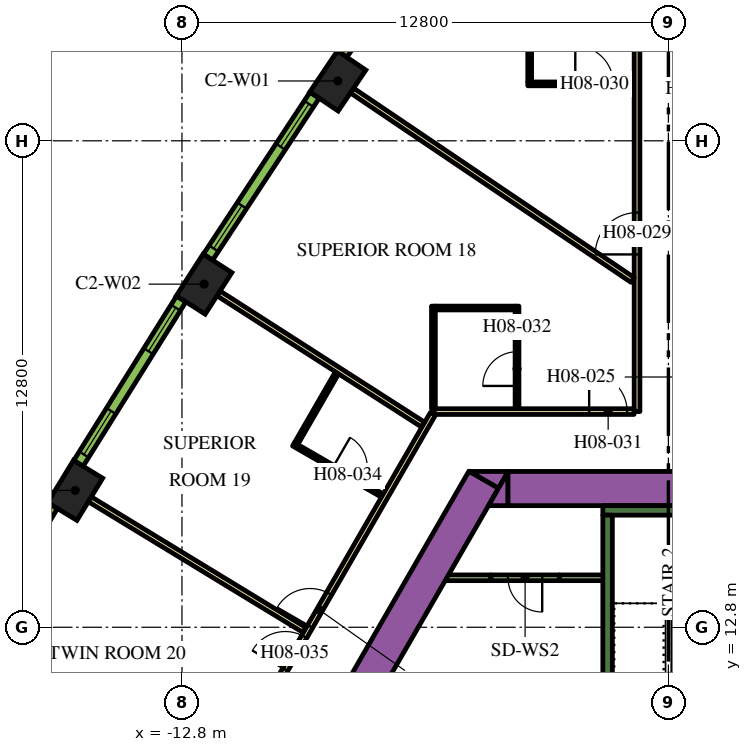
"""IFC4 building model, lengths in metres.
Left out: names, types, materials, properties, quantities, classifications, styles, units other than length and angle.
Written with IfcOpenShell. Run it as: python <this file> out.ifc"""

import sys

from ifc_helpers import new_model, si_unit, direction, frame, frame_2d, origin, origin_2d, place, context, subcontext, project, spatial, polyline, rectangle, outline, extrude, element, fill, save


model = new_model("IFC4")
c1 = context("Model", 3, precision=1e-05, world=origin(), true_north=direction((0.0, 1.0)))
c2 = subcontext(c1, "Body", "Model", "MODEL_VIEW")
j1 = project(units=[si_unit("LENGTHUNIT", "METRE"), si_unit("PLANEANGLEUNIT", "RADIAN")], contexts=[c1])
p1 = place(None, origin())
s1 = spatial("IfcSite", under=j1, at=p1, CompositionType="ELEMENT")
p2 = place(p1, origin())
s2 = spatial("IfcBuilding", under=s1, at=p2, CompositionType="ELEMENT")
p3 = place(p2, frame((0.0, 0.0, 111.0)))
s3 = spatial("IfcBuildingStorey", under=s2, at=p3, CompositionType="ELEMENT", Elevation=111.0)
for number, where, z_axis, x_axis in (
    (1, (-8.699, 27.174, 0.0), (0.0, 0.0, 1.0), (-0.559, -0.829, 0.0)),
    (2, (-12.217, 21.828, 0.0), (0.0, 0.0, 1.0), (-0.54, -0.842, 0.0)),
    (3, (-15.609, 16.402, 0.0), (0.0, 0.0, 1.0), (-0.52, -0.854, 0.0)),
):
    element("IfcColumn", number, at=place(p3, frame(where, z_axis=z_axis, x_axis=x_axis)), inside=s3, PredefinedType="COLUMN", context=c2, shape_type="SweptSolid", body=[
        extrude(rectangle(XDim=1.3, YDim=0.9, at=origin_2d()), origin(), (0.0, 0.0, 1.0), 3.9),
    ])
p4 = place(p3, frame((-15.36, -1.503, 0.0), z_axis=(0.0, 0.0, 1.0), x_axis=(0.50000389221, 0.866023156604, 0.0)))
e4 = element("IfcWall", 4, at=p4, inside=s3, PredefinedType="SOLIDWALL", context=c2, shape_type="SweptSolid", body=[
    extrude(rectangle(XDim=21.0, YDim=0.9, at=frame_2d((10.5, 0.0))), origin(), (0.0, 0.0, 1.0), 3.9),
])
p5 = place(p3, origin())
e5 = element("IfcWall", 5, at=p5, inside=s3, PredefinedType="SOLIDWALL", context=c2, shape_type="SweptSolid", body=[
    extrude(outline(polyline([(-4.215, 16.9), (-4.469, 16.46), (-5.231, 16.9), (-4.215, 16.9)])), origin(), (0.0, 0.0, 1.0), 3.9),
])
p6 = place(p3, frame((-4.224, 16.45, 0.0), z_axis=(0.0, 0.0, 1.0), x_axis=(1.0, 0.0, 0.0)))
e6 = element("IfcWall", 6, at=p6, inside=s3, PredefinedType="SOLIDWALL", context=c2, shape_type="SweptSolid", body=[
    extrude(rectangle(XDim=9.488, YDim=0.9, at=frame_2d((4.744, 0.0))), origin(), (0.0, 0.0, 1.0), 3.9),
])
e7 = element("IfcWall", 7, at=p5, inside=s3, PredefinedType="SOLIDWALL", context=c2, shape_type="SweptSolid", body=[
    extrude(outline(polyline([(-4.734, 16.0), (-4.226, 16.88), (-4.226, 16.0), (-4.734, 16.0)])), origin(), (0.0, 0.0, 1.0), 3.9),
])
p7 = place(p3, frame((-1.725, 15.875, 0.0), z_axis=(0.0, 0.0, 1.0), x_axis=(1.0, 0.0, 0.0)))
e8 = element("IfcWall", 8, at=p7, inside=s3, PredefinedType="SOLIDWALL", context=c2, shape_type="SweptSolid", body=[
    extrude(rectangle(XDim=3.45, YDim=0.25, at=frame_2d((1.725, 0.0))), origin(), (0.0, 0.0, 1.0), 3.9),
])
p8 = place(p3, frame((-1.6, 8.7, 0.0), z_axis=(0.0, 0.0, 1.0), x_axis=(0.0, 1.0, 0.0)))
e9 = element("IfcWall", 9, at=p8, inside=s3, PredefinedType="SOLIDWALL", context=c2, shape_type="SweptSolid", body=[
    extrude(rectangle(XDim=7.05, YDim=0.25, at=frame_2d((3.525, 0.0))), origin(), (0.0, 0.0, 1.0), 3.9),
])
p9 = place(p3, frame((-5.851, 14.102, 0.0), z_axis=(0.0, 0.0, 1.0), x_axis=(1.0, 0.0, 0.0)))
e10 = element("IfcWall", 10, at=p9, inside=s3, PredefinedType="PARTITIONING", context=c2, shape_type="SweptSolid", body=[
    extrude(rectangle(XDim=1.18, YDim=0.15, at=frame_2d((0.59, 0.0))), origin(), (0.0, 0.0, 1.0), 2.75),
])
p10 = place(p3, frame((-2.871, 14.102, 0.0), z_axis=(0.0, 0.0, 1.0), x_axis=(1.0, 0.0, 0.0)))
e11 = element("IfcWall", 11, at=p10, inside=s3, PredefinedType="PARTITIONING", context=c2, shape_type="SweptSolid", body=[
    extrude(rectangle(XDim=1.196, YDim=0.15, at=frame_2d((0.598, 0.0))), origin(), (0.0, 0.0, 1.0), 2.75),
])
p11 = place(p3, frame((-2.871, 14.102, 0.0), z_axis=(0.0, 0.0, 1.0), x_axis=(-1.0, 0.0, 0.0)))
e12 = element("IfcWall", 12, at=p11, inside=s3, PredefinedType="PARTITIONING", context=c2, shape_type="SweptSolid", body=[
    extrude(rectangle(XDim=1.8, YDim=0.15, at=frame_2d((0.9, 0.0))), origin(), (0.0, 0.0, 1.0), 2.75),
])
p12 = place(p11, frame((0.45, 0.0, 0.0)))
e13 = element("IfcOpeningElement", 13, at=p12, cuts=e12, PredefinedType="OPENING", context=c2, shape_type="SweptSolid", body=[
    extrude(rectangle(XDim=0.9, YDim=2.1, at=frame_2d((0.45, 1.05))), frame((0.0, 0.085, 0.0), z_axis=(0.0, -1.0, 0.0), x_axis=(1.0, 0.0, 0.0)), (0.0, 0.0, 1.0), 0.17),
])
p13 = place(p3, frame((-0.825, 18.475, 0.0), z_axis=(0.0, 0.0, 1.0), x_axis=(0.0, 1.0, 0.0)))
e14 = element("IfcWall", 14, at=p13, inside=s3, PredefinedType="PARTITIONING", context=c2, shape_type="SweptSolid", body=[
    extrude(rectangle(XDim=13.623, YDim=0.15, at=frame_2d((6.812, 0.0))), origin(), (0.0, 0.0, 1.0), 2.75),
])
p14 = place(p13, frame((4.135, 0.0, 0.0)))
e15 = element("IfcOpeningElement", 15, at=p14, cuts=e14, PredefinedType="OPENING", context=c2, shape_type="SweptSolid", body=[
    extrude(rectangle(XDim=1.1, YDim=2.1, at=frame_2d((0.55, 1.05))), frame((0.0, 0.085, 0.0), z_axis=(0.0, -1.0, 0.0), x_axis=(1.0, 0.0, 0.0)), (0.0, 0.0, 1.0), 0.17),
])
p15 = place(p3, frame((-6.163, 18.475, 0.0), z_axis=(0.0, 0.0, 1.0), x_axis=(1.0, 0.0, 0.0)))
e16 = element("IfcWall", 16, at=p15, inside=s3, PredefinedType="PARTITIONING", context=c2, shape_type="SweptSolid", body=[
    extrude(rectangle(XDim=5.258, YDim=0.15, at=frame_2d((2.629, 0.0))), origin(), (0.0, 0.0, 1.0), 2.75),
])
p16 = place(p15, frame((4.078, 0.0, 0.0)))
e17 = element("IfcOpeningElement", 17, at=p16, cuts=e16, PredefinedType="OPENING", context=c2, shape_type="SweptSolid", body=[
    extrude(rectangle(XDim=1.0, YDim=2.1, at=frame_2d((0.5, 1.05))), frame((0.0, 0.085, 0.0), z_axis=(0.0, -1.0, 0.0), x_axis=(1.0, 0.0, 0.0)), (0.0, 0.0, 1.0), 0.17),
])
p17 = place(p3, frame((-19.081, -3.9, 0.0), z_axis=(0.0, 0.0, 1.0), x_axis=(0.499998313975, 0.866026377209, 0.0)))
e18 = element("IfcWall", 18, at=p17, inside=s3, PredefinedType="PARTITIONING", context=c2, shape_type="SweptSolid", body=[
    extrude(rectangle(XDim=25.766, YDim=0.15, at=frame_2d((12.883, 0.0))), origin(), (0.0, 0.0, 1.0), 2.75),
])
p18 = place(p17, frame((19.306, 0.0, 0.0)))
e19 = element("IfcOpeningElement", 19, at=p18, cuts=e18, PredefinedType="OPENING", context=c2, shape_type="SweptSolid", body=[
    extrude(rectangle(XDim=1.0, YDim=2.1, at=frame_2d((0.5, 1.05))), frame((0.0, 0.085, 0.0), z_axis=(0.0, -1.0, 0.0), x_axis=(1.0, 0.0, 0.0)), (0.0, 0.0, 1.0), 0.17),
])
p19 = place(p17, frame((18.0, 0.0, 0.0)))
e20 = element("IfcOpeningElement", 20, at=p19, cuts=e18, PredefinedType="OPENING", context=c2, shape_type="SweptSolid", body=[
    extrude(rectangle(XDim=1.0, YDim=2.1, at=frame_2d((0.5, 1.05))), frame((0.0, 0.085, 0.0), z_axis=(0.0, -1.0, 0.0), x_axis=(1.0, 0.0, 0.0)), (0.0, 0.0, 1.0), 0.17),
])
p20 = place(p17, frame((6.838, 0.0, 0.0)))
e21 = element("IfcOpeningElement", 21, at=p20, cuts=e18, PredefinedType="OPENING", context=c2, shape_type="SweptSolid", body=[
    extrude(rectangle(XDim=1.0, YDim=2.1, at=frame_2d((0.5, 1.05))), frame((0.0, 0.085, 0.0), z_axis=(0.0, -1.0, 0.0), x_axis=(1.0, 0.0, 0.0)), (0.0, 0.0, 1.0), 0.17),
])
p21 = place(p17, frame((4.674, 0.0, 0.0)))
e22 = element("IfcOpeningElement", 22, at=p21, cuts=e18, PredefinedType="OPENING", context=c2, shape_type="SweptSolid", body=[
    extrude(rectangle(XDim=0.9, YDim=2.1, at=frame_2d((0.45, 1.05))), frame((0.0, 0.085, 0.0), z_axis=(0.0, -1.0, 0.0), x_axis=(1.0, 0.0, 0.0)), (0.0, 0.0, 1.0), 0.17),
])
p22 = place(p17, frame((0.18, 0.0, 0.0)))
e23 = element("IfcOpeningElement", 23, at=p22, cuts=e18, PredefinedType="OPENING", context=c2, shape_type="SweptSolid", body=[
    extrude(rectangle(XDim=1.0, YDim=2.1, at=frame_2d((0.5, 1.05))), frame((0.0, 0.085, 0.0), z_axis=(0.0, -1.0, 0.0), x_axis=(1.0, 0.0, 0.0)), (0.0, 0.0, 1.0), 0.17),
])
p23 = place(p3, frame((-15.225, 16.167, 0.0), z_axis=(0.0, 0.0, 1.0), x_axis=(0.854088713274, -0.520127359266, 0.0)))
e24 = element("IfcWall", 24, at=p23, inside=s3, PredefinedType="PARTITIONING", context=c2, shape_type="SweptSolid", body=[
    extrude(rectangle(XDim=6.611, YDim=0.15, at=frame_2d((3.305, 0.0))), origin(), (0.0, 0.0, 1.0), 2.75),
])
p24 = place(p3, frame((-11.838, 21.585, 0.0), z_axis=(0.0, 0.0, 1.0), x_axis=(0.841699322813, -0.539946525108, 0.0)))
e25 = element("IfcWall", 25, at=p24, inside=s3, PredefinedType="PARTITIONING", context=c2, shape_type="SweptSolid", body=[
    extrude(rectangle(XDim=6.392, YDim=0.15, at=frame_2d((3.196, 0.0))), origin(), (0.0, 0.0, 1.0), 2.75),
])
p25 = place(p3, frame((-8.326, 26.923, 0.0), z_axis=(0.0, 0.0, 1.0), x_axis=(0.828836601893, -0.5594907393, 0.0)))
e26 = element("IfcWall", 26, at=p25, inside=s3, PredefinedType="PARTITIONING", context=c2, shape_type="SweptSolid", body=[
    extrude(rectangle(XDim=8.909, YDim=0.15, at=frame_2d((4.455, 0.0))), origin(), (0.0, 0.0, 1.0), 2.75),
])
p26 = place(p3, frame((-3.7, 27.098, 0.0), z_axis=(0.0, 0.0, 1.0), x_axis=(1.0, 0.0, 0.0)))
e27 = element("IfcWall", 27, at=p26, inside=s3, PredefinedType="PARTITIONING", context=c2, shape_type="SweptSolid", body=[
    extrude(rectangle(XDim=2.8, YDim=0.1, at=frame_2d((1.4, 0.0))), origin(), (0.0, 0.0, 1.0), 2.75),
])
p27 = place(p26, frame((1.25, 0.0, 0.0)))
e28 = element("IfcOpeningElement", 28, at=p27, cuts=e27, PredefinedType="OPENING", context=c2, shape_type="SweptSolid", body=[
    extrude(rectangle(XDim=1.0, YDim=2.1, at=frame_2d((0.5, 1.05))), frame((0.0, 0.06, 0.0), z_axis=(0.0, -1.0, 0.0), x_axis=(1.0, 0.0, 0.0)), (0.0, 0.0, 1.0), 0.12),
])
p28 = place(p3, frame((-3.65, 27.148, 0.0), z_axis=(0.0, 0.0, 1.0), x_axis=(0.0, 1.0, 0.0)))
e29 = element("IfcWall", 29, at=p28, inside=s3, PredefinedType="PARTITIONING", context=c2, shape_type="SweptSolid", body=[
    extrude(rectangle(XDim=2.5, YDim=0.1, at=frame_2d((1.25, 0.0))), origin(), (0.0, 0.0, 1.0), 2.75),
])
p29 = place(p3, frame((-3.983, 18.55, 0.0), z_axis=(0.0, 0.0, 1.0), x_axis=(0.0, 1.0, 0.0)))
e30 = element("IfcWall", 30, at=p29, inside=s3, PredefinedType="PARTITIONING", context=c2, shape_type="SweptSolid", body=[
    extrude(rectangle(XDim=2.7, YDim=0.1, at=frame_2d((1.35, 0.0))), origin(), (0.0, 0.0, 1.0), 2.75),
])
p30 = place(p29, frame((0.6, 0.0, 0.0)))
e31 = element("IfcOpeningElement", 31, at=p30, cuts=e30, PredefinedType="OPENING", context=c2, shape_type="SweptSolid", body=[
    extrude(rectangle(XDim=0.9, YDim=2.1, at=frame_2d((0.45, 1.05))), frame((0.0, 0.06, 0.0), z_axis=(0.0, -1.0, 0.0), x_axis=(1.0, 0.0, 0.0)), (0.0, 0.0, 1.0), 0.12),
])
p31 = place(p3, frame((-4.033, 21.2, 0.0), z_axis=(0.0, 0.0, 1.0), x_axis=(-1.0, 0.0, 0.0)))
e32 = element("IfcWall", 32, at=p31, inside=s3, PredefinedType="PARTITIONING", context=c2, shape_type="SweptSolid", body=[
    extrude(rectangle(XDim=2.1, YDim=0.1, at=frame_2d((1.05, 0.0))), origin(), (0.0, 0.0, 1.0), 2.75),
])
p32 = place(p3, frame((-6.183, 18.55, 0.0), z_axis=(0.0, 0.0, 1.0), x_axis=(0.0, 1.0, 0.0)))
e33 = element("IfcWall", 33, at=p32, inside=s3, PredefinedType="PARTITIONING", context=c2, shape_type="SweptSolid", body=[
    extrude(rectangle(XDim=2.7, YDim=0.1, at=frame_2d((1.35, 0.0))), origin(), (0.0, 0.0, 1.0), 2.75),
])
p33 = place(p3, frame((-9.864, 17.615, 0.0), z_axis=(0.0, 0.0, 1.0), x_axis=(0.866019956843, -0.50000943426, 0.0)))
e34 = element("IfcWall", 34, at=p33, inside=s3, PredefinedType="PARTITIONING", context=c2, shape_type="SweptSolid", body=[
    extrude(rectangle(XDim=2.7, YDim=0.1, at=frame_2d((1.35, 0.0))), origin(), (0.0, 0.0, 1.0), 2.75),
])
p34 = place(p33, frame((1.2, 0.0, 0.0)))
e35 = element("IfcOpeningElement", 35, at=p34, cuts=e34, PredefinedType="OPENING", context=c2, shape_type="SweptSolid", body=[
    extrude(rectangle(XDim=0.9, YDim=2.1, at=frame_2d((0.45, 1.05))), frame((0.0, 0.06, 0.0), z_axis=(0.0, -1.0, 0.0), x_axis=(1.0, 0.0, 0.0)), (0.0, 0.0, 1.0), 0.12),
])
p35 = place(p3, frame((-9.796, 17.633, 0.0), z_axis=(0.0, 0.0, 1.0), x_axis=(0.499961633463, 0.866047553582, 0.0)))
e36 = element("IfcWall", 36, at=p35, inside=s3, PredefinedType="PARTITIONING", context=c2, shape_type="SweptSolid", body=[
    extrude(rectangle(XDim=2.15, YDim=0.1, at=frame_2d((1.075, 0.0))), origin(), (0.0, 0.0, 1.0), 2.75),
])
p36 = place(p3, frame((-5.673, 32.081, 0.0), z_axis=(0.0, 0.0, 1.0), x_axis=(-0.569113019126, -0.822259309136, 0.0)))
e37 = element("IfcWall", 37, at=p36, inside=s3, PredefinedType="SOLIDWALL", context=c2, shape_type="SweptSolid", body=[
    extrude(rectangle(XDim=5.107, YDim=0.29, at=frame_2d((2.553, 0.0))), origin(), (0.0, 0.0, 1.0), 3.65),
])
p37 = place(p36, frame((0.24, 0.0, 0.9)))
e38 = element("IfcOpeningElement", 38, at=p37, cuts=e37, PredefinedType="OPENING", context=c2, shape_type="SweptSolid", body=[
    extrude(rectangle(XDim=1.35, YDim=2.15, at=frame_2d((0.675, 1.075))), frame((0.0, 0.155, 0.0), z_axis=(0.0, -1.0, 0.0), x_axis=(1.0, 0.0, 0.0)), (0.0, 0.0, 1.0), 0.31),
])
p38 = place(p36, frame((3.471, 0.0, 0.9)))
e39 = element("IfcOpeningElement", 39, at=p38, cuts=e37, PredefinedType="OPENING", context=c2, shape_type="SweptSolid", body=[
    extrude(rectangle(XDim=1.35, YDim=2.15, at=frame_2d((0.675, 1.075))), frame((0.0, 0.155, 0.0), z_axis=(0.0, -1.0, 0.0), x_axis=(1.0, 0.0, 0.0)), (0.0, 0.0, 1.0), 0.31),
])
p39 = place(p3, frame((-9.311, 26.799, 0.0), z_axis=(0.0, 0.0, 1.0), x_axis=(-0.549741341923, -0.835334937005, 0.0)))
e40 = element("IfcWall", 40, at=p39, inside=s3, PredefinedType="SOLIDWALL", context=c2, shape_type="SweptSolid", body=[
    extrude(rectangle(XDim=5.1, YDim=0.29, at=frame_2d((2.55, 0.0))), origin(), (0.0, 0.0, 1.0), 3.65),
])
p40 = place(p39, frame((0.273, 0.0, 0.9)))
e41 = element("IfcOpeningElement", 41, at=p40, cuts=e40, PredefinedType="OPENING", context=c2, shape_type="SweptSolid", body=[
    extrude(rectangle(XDim=1.35, YDim=2.15, at=frame_2d((0.675, 1.075))), frame((0.0, 0.155, 0.0), z_axis=(0.0, -1.0, 0.0), x_axis=(1.0, 0.0, 0.0)), (0.0, 0.0, 1.0), 0.31),
])
p41 = place(p39, frame((3.478, 0.0, 0.9)))
e42 = element("IfcOpeningElement", 42, at=p41, cuts=e40, PredefinedType="OPENING", context=c2, shape_type="SweptSolid", body=[
    extrude(rectangle(XDim=1.35, YDim=2.15, at=frame_2d((0.675, 1.075))), frame((0.0, 0.155, 0.0), z_axis=(0.0, -1.0, 0.0), x_axis=(1.0, 0.0, 0.0)), (0.0, 0.0, 1.0), 0.31),
])
p42 = place(p3, frame((-12.82, 21.439, 0.0), z_axis=(0.0, 0.0, 1.0), x_axis=(-0.530072082134, -0.847952585787, 0.0)))
e43 = element("IfcWall", 43, at=p42, inside=s3, PredefinedType="SOLIDWALL", context=c2, shape_type="SweptSolid", body=[
    extrude(rectangle(XDim=5.1, YDim=0.29, at=frame_2d((2.55, 0.0))), origin(), (0.0, 0.0, 1.0), 3.65),
])
p43 = place(p42, frame((0.273, 0.0, 0.9)))
e44 = element("IfcOpeningElement", 44, at=p43, cuts=e43, PredefinedType="OPENING", context=c2, shape_type="SweptSolid", body=[
    extrude(rectangle(XDim=1.35, YDim=2.15, at=frame_2d((0.675, 1.075))), frame((0.0, 0.155, 0.0), z_axis=(0.0, -1.0, 0.0), x_axis=(1.0, 0.0, 0.0)), (0.0, 0.0, 1.0), 0.31),
])
p44 = place(p42, frame((3.478, 0.0, 0.9)))
e45 = element("IfcOpeningElement", 45, at=p44, cuts=e43, PredefinedType="OPENING", context=c2, shape_type="SweptSolid", body=[
    extrude(rectangle(XDim=1.35, YDim=2.15, at=frame_2d((0.675, 1.075))), frame((0.0, 0.155, 0.0), z_axis=(0.0, -1.0, 0.0), x_axis=(1.0, 0.0, 0.0)), (0.0, 0.0, 1.0), 0.31),
])
p45 = place(p3, frame((-16.203, 15.998, 0.0), z_axis=(0.0, 0.0, 1.0), x_axis=(-0.510054281659, -0.860142214847, 0.0)))
e46 = element("IfcWall", 46, at=p45, inside=s3, PredefinedType="SOLIDWALL", context=c2, shape_type="SweptSolid", body=[
    extrude(rectangle(XDim=5.101, YDim=0.29, at=frame_2d((2.55, 0.0))), origin(), (0.0, 0.0, 1.0), 3.65),
])
p46 = place(p45, frame((0.273, 0.0, 0.9)))
e47 = element("IfcOpeningElement", 47, at=p46, cuts=e46, PredefinedType="OPENING", context=c2, shape_type="SweptSolid", body=[
    extrude(rectangle(XDim=1.35, YDim=2.15, at=frame_2d((0.675, 1.075))), frame((0.0, 0.155, 0.0), z_axis=(0.0, -1.0, 0.0), x_axis=(1.0, 0.0, 0.0)), (0.0, 0.0, 1.0), 0.31),
])
p47 = place(p45, frame((3.478, 0.0, 0.9)))
e48 = element("IfcOpeningElement", 48, at=p47, cuts=e46, PredefinedType="OPENING", context=c2, shape_type="SweptSolid", body=[
    extrude(rectangle(XDim=1.35, YDim=2.15, at=frame_2d((0.675, 1.075))), frame((0.0, 0.155, 0.0), z_axis=(0.0, -1.0, 0.0), x_axis=(1.0, 0.0, 0.0)), (0.0, 0.0, 1.0), 0.31),
])
p48 = place(p12, origin())
e49 = element("IfcDoor", 49, at=p48, inside=s3, OperationType="SINGLE_SWING_LEFT", PredefinedType="DOOR", context=c2, shape_type="SweptSolid", body=[
    extrude(rectangle(XDim=0.9, YDim=2.1, at=frame_2d((0.45, 1.05))), frame((0.0, 0.025, 0.0), z_axis=(0.0, -1.0, 0.0), x_axis=(1.0, 0.0, 0.0)), (0.0, 0.0, 1.0), 0.05),
])
fill(e13, e49)
p49 = place(p14, origin())
e50 = element("IfcDoor", 50, at=p49, inside=s3, OperationType="SINGLE_SWING_LEFT", PredefinedType="DOOR", context=c2, shape_type="SweptSolid", body=[
    extrude(rectangle(XDim=1.1, YDim=2.1, at=frame_2d((0.55, 1.05))), frame((0.0, 0.025, 0.0), z_axis=(0.0, -1.0, 0.0), x_axis=(1.0, 0.0, 0.0)), (0.0, 0.0, 1.0), 0.05),
])
fill(e15, e50)
p50 = place(p27, origin())
e51 = element("IfcDoor", 51, at=p50, inside=s3, OperationType="SINGLE_SWING_LEFT", PredefinedType="DOOR", context=c2, shape_type="SweptSolid", body=[
    extrude(rectangle(XDim=1.0, YDim=2.1, at=frame_2d((0.5, 1.05))), frame((0.0, 0.025, 0.0), z_axis=(0.0, -1.0, 0.0), x_axis=(1.0, 0.0, 0.0)), (0.0, 0.0, 1.0), 0.05),
])
fill(e28, e51)
p51 = place(p16, origin())
e52 = element("IfcDoor", 52, at=p51, inside=s3, OperationType="SINGLE_SWING_RIGHT", PredefinedType="DOOR", context=c2, shape_type="SweptSolid", body=[
    extrude(rectangle(XDim=1.0, YDim=2.1, at=frame_2d((0.5, 1.05))), frame((0.0, 0.025, 0.0), z_axis=(0.0, -1.0, 0.0), x_axis=(1.0, 0.0, 0.0)), (0.0, 0.0, 1.0), 0.05),
])
fill(e17, e52)
p52 = place(p30, origin())
e53 = element("IfcDoor", 53, at=p52, inside=s3, OperationType="SINGLE_SWING_RIGHT", PredefinedType="DOOR", context=c2, shape_type="SweptSolid", body=[
    extrude(rectangle(XDim=0.9, YDim=2.1, at=frame_2d((0.45, 1.05))), frame((0.0, 0.025, 0.0), z_axis=(0.0, -1.0, 0.0), x_axis=(1.0, 0.0, 0.0)), (0.0, 0.0, 1.0), 0.05),
])
fill(e31, e53)
p53 = place(p18, origin())
e54 = element("IfcDoor", 54, at=p53, inside=s3, OperationType="SINGLE_SWING_LEFT", PredefinedType="DOOR", context=c2, shape_type="SweptSolid", body=[
    extrude(rectangle(XDim=1.0, YDim=2.1, at=frame_2d((0.5, 1.05))), frame((0.0, 0.025, 0.0), z_axis=(0.0, -1.0, 0.0), x_axis=(1.0, 0.0, 0.0)), (0.0, 0.0, 1.0), 0.05),
])
fill(e19, e54)
p54 = place(p34, origin())
e55 = element("IfcDoor", 55, at=p54, inside=s3, OperationType="SINGLE_SWING_LEFT", PredefinedType="DOOR", context=c2, shape_type="SweptSolid", body=[
    extrude(rectangle(XDim=0.9, YDim=2.1, at=frame_2d((0.45, 1.05))), frame((0.0, 0.025, 0.0), z_axis=(0.0, -1.0, 0.0), x_axis=(1.0, 0.0, 0.0)), (0.0, 0.0, 1.0), 0.05),
])
fill(e35, e55)
p55 = place(p19, origin())
e56 = element("IfcDoor", 56, at=p55, inside=s3, OperationType="SINGLE_SWING_RIGHT", PredefinedType="DOOR", context=c2, shape_type="SweptSolid", body=[
    extrude(rectangle(XDim=1.0, YDim=2.1, at=frame_2d((0.5, 1.05))), frame((0.0, 0.025, 0.0), z_axis=(0.0, -1.0, 0.0), x_axis=(1.0, 0.0, 0.0)), (0.0, 0.0, 1.0), 0.05),
])
fill(e20, e56)
p56 = place(p40, origin())
e57 = element("IfcWindow", 57, at=p56, inside=s3, PartitioningType="DOUBLE_PANEL_VERTICAL", PredefinedType="WINDOW", context=c2, shape_type="SweptSolid", body=[
    extrude(rectangle(XDim=1.35, YDim=2.15, at=frame_2d((0.675, 1.075))), frame((0.0, 0.015, 0.0), z_axis=(0.0, -1.0, 0.0), x_axis=(1.0, 0.0, 0.0)), (0.0, 0.0, 1.0), 0.06),
])
fill(e41, e57)
p57 = place(p41, origin())
e58 = element("IfcWindow", 58, at=p57, inside=s3, PartitioningType="DOUBLE_PANEL_VERTICAL", PredefinedType="WINDOW", context=c2, shape_type="SweptSolid", body=[
    extrude(rectangle(XDim=1.35, YDim=2.15, at=frame_2d((0.675, 1.075))), frame((0.0, 0.015, 0.0), z_axis=(0.0, -1.0, 0.0), x_axis=(1.0, 0.0, 0.0)), (0.0, 0.0, 1.0), 0.06),
])
fill(e42, e58)
p58 = place(p43, origin())
e59 = element("IfcWindow", 59, at=p58, inside=s3, PartitioningType="DOUBLE_PANEL_VERTICAL", PredefinedType="WINDOW", context=c2, shape_type="SweptSolid", body=[
    extrude(rectangle(XDim=1.35, YDim=2.15, at=frame_2d((0.675, 1.075))), frame((0.0, 0.015, 0.0), z_axis=(0.0, -1.0, 0.0), x_axis=(1.0, 0.0, 0.0)), (0.0, 0.0, 1.0), 0.06),
])
fill(e44, e59)
p59 = place(p44, origin())
e60 = element("IfcWindow", 60, at=p59, inside=s3, PartitioningType="DOUBLE_PANEL_VERTICAL", PredefinedType="WINDOW", context=c2, shape_type="SweptSolid", body=[
    extrude(rectangle(XDim=1.35, YDim=2.15, at=frame_2d((0.675, 1.075))), frame((0.0, 0.015, 0.0), z_axis=(0.0, -1.0, 0.0), x_axis=(1.0, 0.0, 0.0)), (0.0, 0.0, 1.0), 0.06),
])
fill(e45, e60)
save(model, sys.argv[1])
